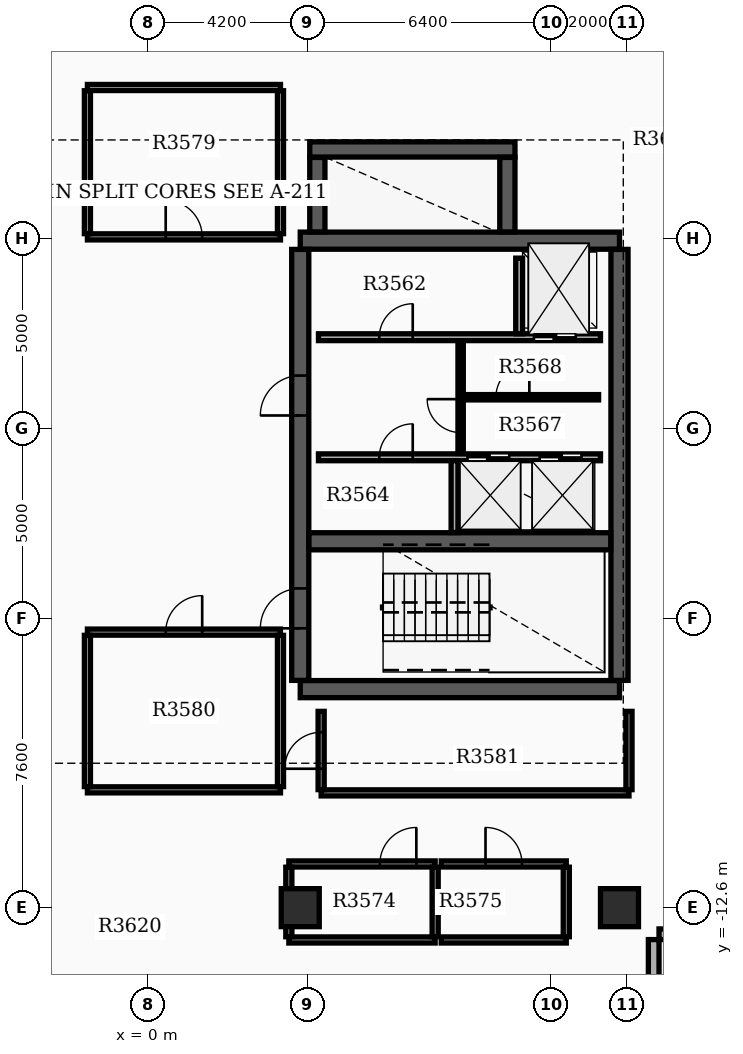
"""IFC4 building model, lengths in metres.
Left out: names, types, materials, properties, quantities, classifications, styles, units other than length and angle.
Written with IfcOpenShell. Run it as: python <this file> out.ifc"""

import sys

from ifc_helpers import new_model, si_unit, direction, frame, frame_2d, origin, origin_2d, place, context, subcontext, project, spatial, rectangle, extrude, element, fill, save


model = new_model("IFC4")
c1 = context("Model", 3, precision=1e-05, world=origin(), true_north=direction((0.0, 1.0)))
c2 = subcontext(c1, "Body", "Model", "MODEL_VIEW")
j1 = project(units=[si_unit("LENGTHUNIT", "METRE"), si_unit("PLANEANGLEUNIT", "RADIAN")], contexts=[c1])
p1 = place(None, origin())
s1 = spatial("IfcSite", under=j1, at=p1, CompositionType="ELEMENT")
p2 = place(p1, origin())
s2 = spatial("IfcBuilding", under=s1, at=p2, CompositionType="ELEMENT")
p3 = place(p2, frame((0.0, 0.0, 224.7)))
s3 = spatial("IfcBuildingStorey", under=s2, at=p3, CompositionType="ELEMENT", Elevation=224.7)
for number, where, z_axis, x_axis in (
    (1, (4.0, -6.85, 0.0), (0.0, 0.0, 1.0), (1.0, 0.0, 0.0)),
    (2, (4.0, 4.95, 0.0), (0.0, 0.0, 1.0), (1.0, 0.0, 0.0)),
):
    element("IfcWall", number, at=place(p3, frame(where, z_axis=z_axis, x_axis=x_axis)), inside=s3, PredefinedType="SHEAR", context=c2, shape_type="SweptSolid", body=[
        extrude(rectangle(XDim=8.4, YDim=0.45, at=frame_2d((4.2, 0.0))), origin(), (0.0, 0.0, 1.0), 3.7),
    ])
p4 = place(p3, frame((4.0, -6.62, 0.0), z_axis=(0.0, 0.0, 1.0), x_axis=(0.0, 1.0, 0.0)))
e3 = element("IfcWall", 3, at=p4, inside=s3, PredefinedType="SHEAR", context=c2, shape_type="SweptSolid", body=[
    extrude(rectangle(XDim=11.34, YDim=0.45, at=frame_2d((5.67, 0.0))), origin(), (0.0, 0.0, 1.0), 3.7),
])
p5 = place(p4, frame((1.37, 0.0, 0.0)))
e4 = element("IfcOpeningElement", 4, at=p5, cuts=e3, PredefinedType="OPENING", context=c2, shape_type="SweptSolid", body=[
    extrude(rectangle(XDim=1.05, YDim=2.15, at=frame_2d((0.525, 1.075))), frame((0.0, 0.235, 0.0), z_axis=(0.0, -1.0, 0.0), x_axis=(1.0, 0.0, 0.0)), (0.0, 0.0, 1.0), 0.47),
])
p6 = place(p4, frame((6.97, 0.0, 0.0)))
e5 = element("IfcOpeningElement", 5, at=p6, cuts=e3, PredefinedType="OPENING", context=c2, shape_type="SweptSolid", body=[
    extrude(rectangle(XDim=1.05, YDim=2.15, at=frame_2d((0.525, 1.075))), frame((0.0, 0.235, 0.0), z_axis=(0.0, -1.0, 0.0), x_axis=(1.0, 0.0, 0.0)), (0.0, 0.0, 1.0), 0.47),
])
p7 = place(p3, frame((12.4, -6.62, 0.0), z_axis=(0.0, 0.0, 1.0), x_axis=(0.0, 1.0, 0.0)))
e6 = element("IfcWall", 6, at=p7, inside=s3, PredefinedType="SHEAR", context=c2, shape_type="SweptSolid", body=[
    extrude(rectangle(XDim=11.34, YDim=0.45, at=frame_2d((5.67, 0.0))), origin(), (0.0, 0.0, 1.0), 3.7),
])
p8 = place(p3, frame((4.23, -2.96, 0.0), z_axis=(0.0, 0.0, 1.0), x_axis=(1.0, 0.0, 0.0)))
e7 = element("IfcWall", 7, at=p8, inside=s3, PredefinedType="SHEAR", context=c2, shape_type="SweptSolid", body=[
    extrude(rectangle(XDim=7.94, YDim=0.45, at=frame_2d((3.97, 0.0))), origin(), (0.0, 0.0, 1.0), 3.7),
])
p9 = place(p3, frame((4.45, 5.18, 0.0), z_axis=(0.0, 0.0, 1.0), x_axis=(0.0, 1.0, 0.0)))
e8 = element("IfcWall", 8, at=p9, inside=s3, PredefinedType="SHEAR", context=c2, shape_type="SweptSolid", body=[
    extrude(rectangle(XDim=1.96, YDim=0.4, at=frame_2d((0.98, 0.0))), origin(), (0.0, 0.0, 1.0), 3.7),
])
p10 = place(p3, frame((4.25, 7.35, 0.0), z_axis=(0.0, 0.0, 1.0), x_axis=(1.0, 0.0, 0.0)))
e9 = element("IfcWall", 9, at=p10, inside=s3, PredefinedType="SHEAR", context=c2, shape_type="SweptSolid", body=[
    extrude(rectangle(XDim=5.4, YDim=0.4, at=frame_2d((2.7, 0.0))), origin(), (0.0, 0.0, 1.0), 3.7),
])
p11 = place(p3, frame((9.45, 5.18, 0.0), z_axis=(0.0, 0.0, 1.0), x_axis=(0.0, 1.0, 0.0)))
e10 = element("IfcWall", 10, at=p11, inside=s3, PredefinedType="SHEAR", context=c2, shape_type="SweptSolid", body=[
    extrude(rectangle(XDim=1.96, YDim=0.4, at=frame_2d((0.98, 0.0))), origin(), (0.0, 0.0, 1.0), 3.7),
])
for number, where, z_axis, x_axis in (
    (11, (12.4, -12.6, 0.0), (0.0, 0.0, 1.0), (1.0, 0.0, 0.0)),
    (12, (4.0, -12.6, 0.0), (0.0, 0.0, 1.0), (1.0, 0.0, 0.0)),
):
    element("IfcColumn", number, at=place(p3, frame(where, z_axis=z_axis, x_axis=x_axis)), inside=s3, PredefinedType="COLUMN", context=c2, shape_type="SweptSolid", body=[
        extrude(rectangle(XDim=1.0, YDim=1.0, at=origin_2d()), origin(), (0.0, 0.0, 1.0), 3.9),
    ])
p12 = place(p3, frame((14.66, -13.3, 0.0), z_axis=(0.0, 0.0, 1.0), x_axis=(-1.0, 0.0, 0.0)))
e13 = element("IfcWall", 13, at=p12, inside=s3, PredefinedType="STANDARD", context=c2, shape_type="SweptSolid", body=[
    extrude(rectangle(XDim=1.22, YDim=0.28, at=frame_2d((0.61, 0.0))), origin(), (0.0, 0.0, 1.0), 3.18),
])
p13 = place(p3, frame((13.3, -13.44, 0.0), z_axis=(0.0, 0.0, 1.0), x_axis=(0.0, -1.0, 0.0)))
e14 = element("IfcWall", 14, at=p13, inside=s3, PredefinedType="STANDARD", context=c2, shape_type="SweptSolid", body=[
    extrude(rectangle(XDim=1.5, YDim=0.28, at=frame_2d((0.75, 0.0))), origin(), (0.0, 0.0, 1.0), 3.18),
])
p14 = place(p3, frame((4.48, 2.41, 0.0), z_axis=(0.0, 0.0, 1.0), x_axis=(1.0, 0.0, 0.0)))
e15 = element("IfcWall", 15, at=p14, inside=s3, PredefinedType="SOLIDWALL", context=c2, shape_type="SweptSolid", body=[
    extrude(rectangle(XDim=7.42, YDim=0.18, at=frame_2d((3.71, 0.0))), origin(), (0.0, 0.0, 1.0), 3.17),
])
p15 = place(p14, frame((5.67, 0.0, 0.0)))
e16 = element("IfcOpeningElement", 16, at=p15, cuts=e15, PredefinedType="OPENING", context=c2, shape_type="SweptSolid", body=[
    extrude(rectangle(XDim=1.1, YDim=2.15, at=frame_2d((0.55, 1.075))), frame((0.0, 0.1, 0.0), z_axis=(0.0, -1.0, 0.0), x_axis=(1.0, 0.0, 0.0)), (0.0, 0.0, 1.0), 0.2),
])
p16 = place(p14, frame((1.6, 0.0, 0.0)))
e17 = element("IfcOpeningElement", 17, at=p16, cuts=e15, PredefinedType="OPENING", context=c2, shape_type="SweptSolid", body=[
    extrude(rectangle(XDim=0.88, YDim=2.1, at=frame_2d((0.44, 1.05))), frame((0.0, 0.1, 0.0), z_axis=(0.0, -1.0, 0.0), x_axis=(1.0, 0.0, 0.0)), (0.0, 0.0, 1.0), 0.2),
])
p17 = place(p3, frame((4.48, -0.75, 0.0), z_axis=(0.0, 0.0, 1.0), x_axis=(1.0, 0.0, 0.0)))
e18 = element("IfcWall", 18, at=p17, inside=s3, PredefinedType="SOLIDWALL", context=c2, shape_type="SweptSolid", body=[
    extrude(rectangle(XDim=7.42, YDim=0.18, at=frame_2d((3.71, 0.0))), origin(), (0.0, 0.0, 1.0), 3.17),
])
p18 = place(p17, frame((3.92, 0.0, 0.0)))
e19 = element("IfcOpeningElement", 19, at=p18, cuts=e18, PredefinedType="OPENING", context=c2, shape_type="SweptSolid", body=[
    extrude(rectangle(XDim=1.1, YDim=2.15, at=frame_2d((0.55, 1.075))), frame((0.0, 0.1, 0.0), z_axis=(0.0, -1.0, 0.0), x_axis=(1.0, 0.0, 0.0)), (0.0, 0.0, 1.0), 0.2),
])
p19 = place(p17, frame((5.82, 0.0, 0.0)))
e20 = element("IfcOpeningElement", 20, at=p19, cuts=e18, PredefinedType="OPENING", context=c2, shape_type="SweptSolid", body=[
    extrude(rectangle(XDim=1.1, YDim=2.15, at=frame_2d((0.55, 1.075))), frame((0.0, 0.1, 0.0), z_axis=(0.0, -1.0, 0.0), x_axis=(1.0, 0.0, 0.0)), (0.0, 0.0, 1.0), 0.2),
])
p20 = place(p17, frame((1.6, 0.0, 0.0)))
e21 = element("IfcOpeningElement", 21, at=p20, cuts=e18, PredefinedType="OPENING", context=c2, shape_type="SweptSolid", body=[
    extrude(rectangle(XDim=0.88, YDim=2.1, at=frame_2d((0.44, 1.05))), frame((0.0, 0.1, 0.0), z_axis=(0.0, -1.0, 0.0), x_axis=(1.0, 0.0, 0.0)), (0.0, 0.0, 1.0), 0.2),
])
p21 = place(p3, frame((9.76, 2.5, 0.0), z_axis=(0.0, 0.0, 1.0), x_axis=(0.0, 1.0, 0.0)))
e22 = element("IfcWall", 22, at=p21, inside=s3, PredefinedType="SOLIDWALL", context=c2, shape_type="SweptSolid", body=[
    extrude(rectangle(XDim=1.99, YDim=0.18, at=frame_2d((0.995, 0.0))), origin(), (0.0, 0.0, 1.0), 3.17),
])
p22 = place(p3, frame((8.06, -2.73, 0.0), z_axis=(0.0, 0.0, 1.0), x_axis=(0.0, 1.0, 0.0)))
e23 = element("IfcWall", 23, at=p22, inside=s3, PredefinedType="SOLIDWALL", context=c2, shape_type="SweptSolid", body=[
    extrude(rectangle(XDim=1.89, YDim=0.18, at=frame_2d((0.945, 0.0))), origin(), (0.0, 0.0, 1.0), 3.17),
])
p23 = place(p3, frame((8.22, -0.65, 0.0), z_axis=(0.0, 0.0, 1.0), x_axis=(0.0, 1.0, 0.0)))
e24 = element("IfcWall", 24, at=p23, inside=s3, PredefinedType="SOLIDWALL", context=c2, shape_type="SweptSolid", body=[
    extrude(rectangle(XDim=2.96, YDim=0.14, at=frame_2d((1.48, 0.0))), origin(), (0.0, 0.0, 1.0), 3.17),
])
p24 = place(p23, frame((0.55, 0.0, 0.0)))
e25 = element("IfcOpeningElement", 25, at=p24, cuts=e24, PredefinedType="OPENING", context=c2, shape_type="SweptSolid", body=[
    extrude(rectangle(XDim=0.88, YDim=2.1, at=frame_2d((0.44, 1.05))), frame((0.0, 0.08, 0.0), z_axis=(0.0, -1.0, 0.0), x_axis=(1.0, 0.0, 0.0)), (0.0, 0.0, 1.0), 0.16),
])
p25 = place(p3, frame((8.298, 0.83, 0.0), z_axis=(0.0, 0.0, 1.0), x_axis=(1.0, 0.0, 0.0)))
e26 = element("IfcWall", 26, at=p25, inside=s3, PredefinedType="PARTITIONING", context=c2, shape_type="SweptSolid", body=[
    extrude(rectangle(XDim=3.552, YDim=0.14, at=frame_2d((1.776, 0.0))), origin(), (0.0, 0.0, 1.0), 3.17),
])
p26 = place(p25, frame((0.85, 0.0, 0.0)))
e27 = element("IfcOpeningElement", 27, at=p26, cuts=e26, PredefinedType="OPENING", context=c2, shape_type="SweptSolid", body=[
    extrude(rectangle(XDim=0.88, YDim=2.1, at=frame_2d((0.44, 1.05))), frame((0.0, 0.08, 0.0), z_axis=(0.0, -1.0, 0.0), x_axis=(1.0, 0.0, 0.0)), (0.0, 0.0, 1.0), 0.16),
])
p27 = place(p3, frame((3.7, -13.45, 0.0), z_axis=(0.0, 0.0, 1.0), x_axis=(1.0, 0.0, 0.0)))
e28 = element("IfcWall", 28, at=p27, inside=s3, PredefinedType="PARTITIONING", context=c2, shape_type="SweptSolid", body=[
    extrude(rectangle(XDim=3.85, YDim=0.16, at=frame_2d((1.925, 0.0))), origin(), (0.0, 0.0, 1.0), 3.17),
])
p28 = place(p3, frame((3.7, -11.45, 0.0), z_axis=(0.0, 0.0, 1.0), x_axis=(1.0, 0.0, 0.0)))
e29 = element("IfcWall", 29, at=p28, inside=s3, PredefinedType="PARTITIONING", context=c2, shape_type="SweptSolid", body=[
    extrude(rectangle(XDim=3.85, YDim=0.16, at=frame_2d((1.925, 0.0))), origin(), (0.0, 0.0, 1.0), 3.17),
])
p29 = place(p28, frame((2.395, 0.0, 0.0)))
e30 = element("IfcOpeningElement", 30, at=p29, cuts=e29, PredefinedType="OPENING", context=c2, shape_type="SweptSolid", body=[
    extrude(rectangle(XDim=0.96, YDim=2.15, at=frame_2d((0.48, 1.075))), frame((0.0, 0.09, 0.0), z_axis=(0.0, -1.0, 0.0), x_axis=(1.0, 0.0, 0.0)), (0.0, 0.0, 1.0), 0.18),
])
for number, where, z_axis, x_axis in (
    (31, (3.7, -13.365, 0.0), (0.0, 0.0, 1.0), (0.0, 1.0, 0.0)),
    (32, (7.55, -13.365, 0.0), (0.0, 0.0, 1.0), (0.0, 1.0, 0.0)),
):
    element("IfcWall", number, at=place(p3, frame(where, z_axis=z_axis, x_axis=x_axis)), inside=s3, PredefinedType="PARTITIONING", context=c2, shape_type="SweptSolid", body=[
        extrude(rectangle(XDim=1.83, YDim=0.16, at=frame_2d((0.915, 0.0))), origin(), (0.0, 0.0, 1.0), 3.17),
    ])
p30 = place(p3, frame((7.71, -13.45, 0.0), z_axis=(0.0, 0.0, 1.0), x_axis=(1.0, 0.0, 0.0)))
e33 = element("IfcWall", 33, at=p30, inside=s3, PredefinedType="PARTITIONING", context=c2, shape_type="SweptSolid", body=[
    extrude(rectangle(XDim=3.29, YDim=0.16, at=frame_2d((1.645, 0.0))), origin(), (0.0, 0.0, 1.0), 3.17),
])
p31 = place(p3, frame((7.71, -11.45, 0.0), z_axis=(0.0, 0.0, 1.0), x_axis=(1.0, 0.0, 0.0)))
e34 = element("IfcWall", 34, at=p31, inside=s3, PredefinedType="PARTITIONING", context=c2, shape_type="SweptSolid", body=[
    extrude(rectangle(XDim=3.29, YDim=0.16, at=frame_2d((1.645, 0.0))), origin(), (0.0, 0.0, 1.0), 3.17),
])
p32 = place(p31, frame((1.165, 0.0, 0.0)))
e35 = element("IfcOpeningElement", 35, at=p32, cuts=e34, PredefinedType="OPENING", context=c2, shape_type="SweptSolid", body=[
    extrude(rectangle(XDim=0.96, YDim=2.15, at=frame_2d((0.48, 1.075))), frame((0.0, 0.09, 0.0), z_axis=(0.0, -1.0, 0.0), x_axis=(1.0, 0.0, 0.0)), (0.0, 0.0, 1.0), 0.18),
])
p33 = place(p3, frame((11.0, -13.365, 0.0), z_axis=(0.0, 0.0, 1.0), x_axis=(0.0, 1.0, 0.0)))
e36 = element("IfcWall", 36, at=p33, inside=s3, PredefinedType="PARTITIONING", context=c2, shape_type="SweptSolid", body=[
    extrude(rectangle(XDim=1.83, YDim=0.16, at=frame_2d((0.915, 0.0))), origin(), (0.0, 0.0, 1.0), 3.17),
])
p34 = place(p3, frame((-1.6, 5.05, 0.0), z_axis=(0.0, 0.0, 1.0), x_axis=(1.0, 0.0, 0.0)))
e37 = element("IfcWall", 37, at=p34, inside=s3, PredefinedType="PARTITIONING", context=c2, shape_type="SweptSolid", body=[
    extrude(rectangle(XDim=5.08, YDim=0.16, at=frame_2d((2.54, 0.0))), origin(), (0.0, 0.0, 1.0), 3.17),
])
p35 = place(p34, frame((2.06, 0.0, 0.0)))
e38 = element("IfcOpeningElement", 38, at=p35, cuts=e37, PredefinedType="OPENING", context=c2, shape_type="SweptSolid", body=[
    extrude(rectangle(XDim=0.96, YDim=2.15, at=frame_2d((0.48, 1.075))), frame((0.0, 0.09, 0.0), z_axis=(0.0, -1.0, 0.0), x_axis=(1.0, 0.0, 0.0)), (0.0, 0.0, 1.0), 0.18),
])
p36 = place(p3, frame((-1.6, 8.98, 0.0), z_axis=(0.0, 0.0, 1.0), x_axis=(1.0, 0.0, 0.0)))
e39 = element("IfcWall", 39, at=p36, inside=s3, PredefinedType="PARTITIONING", context=c2, shape_type="SweptSolid", body=[
    extrude(rectangle(XDim=5.08, YDim=0.16, at=frame_2d((2.54, 0.0))), origin(), (0.0, 0.0, 1.0), 3.17),
])
for number, where, z_axis, x_axis in (
    (40, (-1.6, 5.135, 0.0), (0.0, 0.0, 1.0), (0.0, 1.0, 0.0)),
    (41, (3.48, 5.135, 0.0), (0.0, 0.0, 1.0), (0.0, 1.0, 0.0)),
):
    element("IfcWall", number, at=place(p3, frame(where, z_axis=z_axis, x_axis=x_axis)), inside=s3, PredefinedType="PARTITIONING", context=c2, shape_type="SweptSolid", body=[
        extrude(rectangle(XDim=3.76, YDim=0.16, at=frame_2d((1.88, 0.0))), origin(), (0.0, 0.0, 1.0), 3.17),
    ])
p37 = place(p3, frame((-1.6, -9.5, 0.0), z_axis=(0.0, 0.0, 1.0), x_axis=(1.0, 0.0, 0.0)))
e42 = element("IfcWall", 42, at=p37, inside=s3, PredefinedType="PARTITIONING", context=c2, shape_type="SweptSolid", body=[
    extrude(rectangle(XDim=5.08, YDim=0.16, at=frame_2d((2.54, 0.0))), origin(), (0.0, 0.0, 1.0), 3.17),
])
p38 = place(p3, frame((-1.6, -5.35, 0.0), z_axis=(0.0, 0.0, 1.0), x_axis=(1.0, 0.0, 0.0)))
e43 = element("IfcWall", 43, at=p38, inside=s3, PredefinedType="PARTITIONING", context=c2, shape_type="SweptSolid", body=[
    extrude(rectangle(XDim=5.08, YDim=0.16, at=frame_2d((2.54, 0.0))), origin(), (0.0, 0.0, 1.0), 3.17),
])
p39 = place(p38, frame((2.06, 0.0, 0.0)))
e44 = element("IfcOpeningElement", 44, at=p39, cuts=e43, PredefinedType="OPENING", context=c2, shape_type="SweptSolid", body=[
    extrude(rectangle(XDim=0.96, YDim=2.15, at=frame_2d((0.48, 1.075))), frame((0.0, 0.09, 0.0), z_axis=(0.0, -1.0, 0.0), x_axis=(1.0, 0.0, 0.0)), (0.0, 0.0, 1.0), 0.18),
])
for number, where, z_axis, x_axis in (
    (45, (-1.6, -9.415, 0.0), (0.0, 0.0, 1.0), (0.0, 1.0, 0.0)),
    (46, (3.48, -9.415, 0.0), (0.0, 0.0, 1.0), (0.0, 1.0, 0.0)),
):
    element("IfcWall", number, at=place(p3, frame(where, z_axis=z_axis, x_axis=x_axis)), inside=s3, PredefinedType="PARTITIONING", context=c2, shape_type="SweptSolid", body=[
        extrude(rectangle(XDim=3.98, YDim=0.16, at=frame_2d((1.99, 0.0))), origin(), (0.0, 0.0, 1.0), 3.17),
    ])
p40 = place(p3, frame((4.55, -9.58, 0.0), z_axis=(0.0, 0.0, 1.0), x_axis=(1.0, 0.0, 0.0)))
e47 = element("IfcWall", 47, at=p40, inside=s3, PredefinedType="PARTITIONING", context=c2, shape_type="SweptSolid", body=[
    extrude(rectangle(XDim=8.1, YDim=0.16, at=frame_2d((4.05, 0.0))), origin(), (0.0, 0.0, 1.0), 3.17),
])
p41 = place(p3, frame((4.55, -9.495, 0.0), z_axis=(0.0, 0.0, 1.0), x_axis=(0.0, 1.0, 0.0)))
e48 = element("IfcWall", 48, at=p41, inside=s3, PredefinedType="PARTITIONING", context=c2, shape_type="SweptSolid", body=[
    extrude(rectangle(XDim=2.06, YDim=0.16, at=frame_2d((1.03, 0.0))), origin(), (0.0, 0.0, 1.0), 3.17),
])
p42 = place(p41, frame((0.55, 0.0, 0.0)))
e49 = element("IfcOpeningElement", 49, at=p42, cuts=e48, PredefinedType="OPENING", context=c2, shape_type="SweptSolid", body=[
    extrude(rectangle(XDim=0.96, YDim=2.15, at=frame_2d((0.48, 1.075))), frame((0.0, 0.09, 0.0), z_axis=(0.0, -1.0, 0.0), x_axis=(1.0, 0.0, 0.0)), (0.0, 0.0, 1.0), 0.18),
])
p43 = place(p3, frame((12.65, -9.495, 0.0), z_axis=(0.0, 0.0, 1.0), x_axis=(0.0, 1.0, 0.0)))
e50 = element("IfcWall", 50, at=p43, inside=s3, PredefinedType="PARTITIONING", context=c2, shape_type="SweptSolid", body=[
    extrude(rectangle(XDim=2.06, YDim=0.16, at=frame_2d((1.03, 0.0))), origin(), (0.0, 0.0, 1.0), 3.17),
])
p44 = place(p5, origin())
e51 = element("IfcDoor", 51, at=p44, inside=s3, OperationType="SINGLE_SWING_LEFT", PredefinedType="DOOR", context=c2, shape_type="SweptSolid", body=[
    extrude(rectangle(XDim=1.05, YDim=2.15, at=frame_2d((0.525, 1.075))), frame((0.0, 0.025, 0.0), z_axis=(0.0, -1.0, 0.0), x_axis=(1.0, 0.0, 0.0)), (0.0, 0.0, 1.0), 0.05),
])
fill(e4, e51)
p45 = place(p6, origin())
e52 = element("IfcDoor", 52, at=p45, inside=s3, OperationType="SINGLE_SWING_LEFT", PredefinedType="DOOR", context=c2, shape_type="SweptSolid", body=[
    extrude(rectangle(XDim=1.05, YDim=2.15, at=frame_2d((0.525, 1.075))), frame((0.0, 0.025, 0.0), z_axis=(0.0, -1.0, 0.0), x_axis=(1.0, 0.0, 0.0)), (0.0, 0.0, 1.0), 0.05),
])
fill(e5, e52)
p46 = place(p15, origin())
e53 = element("IfcDoor", 53, at=p46, inside=s3, OperationType="DOUBLE_DOOR_SLIDING", PredefinedType="DOOR", context=c2, shape_type="SweptSolid", body=[
    extrude(rectangle(XDim=1.1, YDim=2.15, at=frame_2d((0.55, 1.075))), frame((0.0, 0.025, 0.0), z_axis=(0.0, -1.0, 0.0), x_axis=(1.0, 0.0, 0.0)), (0.0, 0.0, 1.0), 0.05),
])
fill(e16, e53)
p47 = place(p18, origin())
e54 = element("IfcDoor", 54, at=p47, inside=s3, OperationType="DOUBLE_DOOR_SLIDING", PredefinedType="DOOR", context=c2, shape_type="SweptSolid", body=[
    extrude(rectangle(XDim=1.1, YDim=2.15, at=frame_2d((0.55, 1.075))), frame((0.0, 0.025, 0.0), z_axis=(0.0, -1.0, 0.0), x_axis=(1.0, 0.0, 0.0)), (0.0, 0.0, 1.0), 0.05),
])
fill(e19, e54)
p48 = place(p19, origin())
e55 = element("IfcDoor", 55, at=p48, inside=s3, OperationType="DOUBLE_DOOR_SLIDING", PredefinedType="DOOR", context=c2, shape_type="SweptSolid", body=[
    extrude(rectangle(XDim=1.1, YDim=2.15, at=frame_2d((0.55, 1.075))), frame((0.0, 0.025, 0.0), z_axis=(0.0, -1.0, 0.0), x_axis=(1.0, 0.0, 0.0)), (0.0, 0.0, 1.0), 0.05),
])
fill(e20, e55)
p49 = place(p16, origin())
e56 = element("IfcDoor", 56, at=p49, inside=s3, OperationType="SINGLE_SWING_RIGHT", PredefinedType="DOOR", context=c2, shape_type="SweptSolid", body=[
    extrude(rectangle(XDim=0.88, YDim=2.1, at=frame_2d((0.44, 1.05))), frame((0.0, 0.025, 0.0), z_axis=(0.0, -1.0, 0.0), x_axis=(1.0, 0.0, 0.0)), (0.0, 0.0, 1.0), 0.05),
])
fill(e17, e56)
p50 = place(p20, origin())
e57 = element("IfcDoor", 57, at=p50, inside=s3, OperationType="SINGLE_SWING_RIGHT", PredefinedType="DOOR", context=c2, shape_type="SweptSolid", body=[
    extrude(rectangle(XDim=0.88, YDim=2.1, at=frame_2d((0.44, 1.05))), frame((0.0, 0.025, 0.0), z_axis=(0.0, -1.0, 0.0), x_axis=(1.0, 0.0, 0.0)), (0.0, 0.0, 1.0), 0.05),
])
fill(e21, e57)
p51 = place(p24, origin())
e58 = element("IfcDoor", 58, at=p51, inside=s3, OperationType="SINGLE_SWING_RIGHT", PredefinedType="DOOR", context=c2, shape_type="SweptSolid", body=[
    extrude(rectangle(XDim=0.88, YDim=2.1, at=frame_2d((0.44, 1.05))), frame((0.0, 0.025, 0.0), z_axis=(0.0, -1.0, 0.0), x_axis=(1.0, 0.0, 0.0)), (0.0, 0.0, 1.0), 0.05),
])
fill(e25, e58)
p52 = place(p26, origin())
e59 = element("IfcDoor", 59, at=p52, inside=s3, OperationType="SINGLE_SWING_RIGHT", PredefinedType="DOOR", context=c2, shape_type="SweptSolid", body=[
    extrude(rectangle(XDim=0.88, YDim=2.1, at=frame_2d((0.44, 1.05))), frame((0.0, 0.025, 0.0), z_axis=(0.0, -1.0, 0.0), x_axis=(1.0, 0.0, 0.0)), (0.0, 0.0, 1.0), 0.05),
])
fill(e27, e59)
p53 = place(p29, origin())
e60 = element("IfcDoor", 60, at=p53, inside=s3, OperationType="SINGLE_SWING_RIGHT", PredefinedType="DOOR", context=c2, shape_type="SweptSolid", body=[
    extrude(rectangle(XDim=0.96, YDim=2.15, at=frame_2d((0.48, 1.075))), frame((0.0, 0.025, 0.0), z_axis=(0.0, -1.0, 0.0), x_axis=(1.0, 0.0, 0.0)), (0.0, 0.0, 1.0), 0.05),
])
fill(e30, e60)
p54 = place(p32, origin())
e61 = element("IfcDoor", 61, at=p54, inside=s3, OperationType="SINGLE_SWING_LEFT", PredefinedType="DOOR", context=c2, shape_type="SweptSolid", body=[
    extrude(rectangle(XDim=0.96, YDim=2.15, at=frame_2d((0.48, 1.075))), frame((0.0, 0.025, 0.0), z_axis=(0.0, -1.0, 0.0), x_axis=(1.0, 0.0, 0.0)), (0.0, 0.0, 1.0), 0.05),
])
fill(e35, e61)
p55 = place(p35, origin())
e62 = element("IfcDoor", 62, at=p55, inside=s3, OperationType="SINGLE_SWING_LEFT", PredefinedType="DOOR", context=c2, shape_type="SweptSolid", body=[
    extrude(rectangle(XDim=0.96, YDim=2.15, at=frame_2d((0.48, 1.075))), frame((0.0, 0.025, 0.0), z_axis=(0.0, -1.0, 0.0), x_axis=(1.0, 0.0, 0.0)), (0.0, 0.0, 1.0), 0.05),
])
fill(e38, e62)
p56 = place(p39, origin())
e63 = element("IfcDoor", 63, at=p56, inside=s3, OperationType="SINGLE_SWING_RIGHT", PredefinedType="DOOR", context=c2, shape_type="SweptSolid", body=[
    extrude(rectangle(XDim=0.96, YDim=2.15, at=frame_2d((0.48, 1.075))), frame((0.0, 0.025, 0.0), z_axis=(0.0, -1.0, 0.0), x_axis=(1.0, 0.0, 0.0)), (0.0, 0.0, 1.0), 0.05),
])
fill(e44, e63)
p57 = place(p42, origin())
e64 = element("IfcDoor", 64, at=p57, inside=s3, OperationType="SINGLE_SWING_LEFT", PredefinedType="DOOR", context=c2, shape_type="SweptSolid", body=[
    extrude(rectangle(XDim=0.96, YDim=2.15, at=frame_2d((0.48, 1.075))), frame((0.0, 0.025, 0.0), z_axis=(0.0, -1.0, 0.0), x_axis=(1.0, 0.0, 0.0)), (0.0, 0.0, 1.0), 0.05),
])
fill(e49, e64)
save(model, sys.argv[1])
